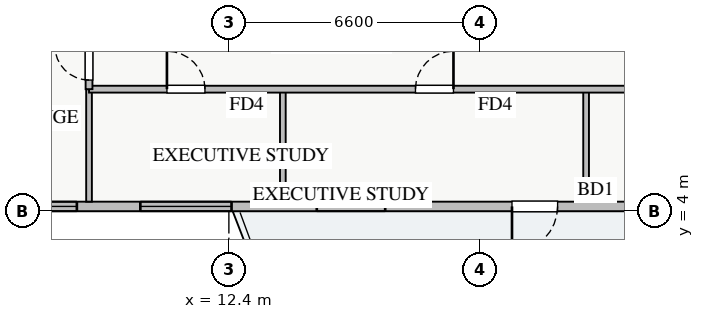
"""IFC4 building model, lengths in metres.
Left out: names, types, materials, properties, quantities, classifications, styles, units other than length and angle.
Written with IfcOpenShell. Run it as: python <this file> out.ifc"""

import sys

from ifc_helpers import new_model, si_unit, direction, frame, frame_2d, origin, place, context, subcontext, project, spatial, rectangle, extrude, source, transform, mapped, element, fill, save


model = new_model("IFC4")
c1 = context("Model", 3, precision=1e-05, world=origin(), true_north=direction((0.0, 1.0)))
c2 = subcontext(c1, "Body", "Model", "MODEL_VIEW")
j1 = project(units=[si_unit("LENGTHUNIT", "METRE"), si_unit("PLANEANGLEUNIT", "RADIAN")], contexts=[c1])
p1 = place(None, origin())
s1 = spatial("IfcSite", under=j1, at=p1, CompositionType="ELEMENT")
p2 = place(p1, origin())
s2 = spatial("IfcBuilding", under=s1, at=p2, CompositionType="ELEMENT")
p3 = place(p2, frame((0.0, 0.0, 42.5)))
s3 = spatial("IfcBuildingStorey", under=s2, at=p3, CompositionType="ELEMENT", Elevation=42.5)
p4 = place(p3, frame((5.45, 4.125, 0.0), z_axis=(0.0, 0.0, 1.0), x_axis=(1.0, 0.0, 0.0)))
e1 = element("IfcWall", 1, at=p4, inside=s3, PredefinedType="STANDARD", context=c2, shape_type="SweptSolid", body=[
    extrude(rectangle(XDim=27.1, YDim=0.25, at=frame_2d((13.55, 0.0))), origin(), (0.0, 0.0, 1.0), 2.57),
])
p5 = place(p4, frame((14.4, 0.0, 0.0)))
e2 = element("IfcOpeningElement", 2, at=p5, cuts=e1, PredefinedType="OPENING", context=c2, shape_type="SweptSolid", body=[
    extrude(rectangle(XDim=1.2, YDim=2.1, at=frame_2d((0.6, 1.05))), frame((0.0, 0.135, 0.0), z_axis=(0.0, -1.0, 0.0), x_axis=(1.0, 0.0, 0.0)), (0.0, 0.0, 1.0), 0.27),
])
p6 = place(p4, frame((1.45, 0.0, 0.9)))
e3 = element("IfcOpeningElement", 3, at=p6, cuts=e1, PredefinedType="OPENING", context=c2, shape_type="SweptSolid", body=[
    extrude(rectangle(XDim=1.5, YDim=1.5, at=frame_2d((0.75, 0.75))), frame((0.0, 0.135, 0.0), z_axis=(0.0, -1.0, 0.0), x_axis=(1.0, 0.0, 0.0)), (0.0, 0.0, 1.0), 0.27),
])
p7 = place(p4, frame((9.263, 0.0, 0.9)))
e4 = element("IfcOpeningElement", 4, at=p7, cuts=e1, PredefinedType="OPENING", context=c2, shape_type="SweptSolid", body=[
    extrude(rectangle(XDim=1.8, YDim=1.45, at=frame_2d((0.9, 0.725))), frame((0.0, 0.135, 0.0), z_axis=(0.0, -1.0, 0.0), x_axis=(1.0, 0.0, 0.0)), (0.0, 0.0, 1.0), 0.27),
])
p8 = place(p4, frame((17.92, 0.0, 0.9)))
e5 = element("IfcOpeningElement", 5, at=p8, cuts=e1, PredefinedType="OPENING", context=c2, shape_type="SweptSolid", body=[
    extrude(rectangle(XDim=1.5, YDim=1.5, at=frame_2d((0.75, 0.75))), frame((0.0, 0.135, 0.0), z_axis=(0.0, -1.0, 0.0), x_axis=(1.0, 0.0, 0.0)), (0.0, 0.0, 1.0), 0.27),
])
p9 = place(p4, frame((22.663, 0.0, 0.9)))
e6 = element("IfcOpeningElement", 6, at=p9, cuts=e1, PredefinedType="OPENING", context=c2, shape_type="SweptSolid", body=[
    extrude(rectangle(XDim=2.1, YDim=1.48, at=frame_2d((1.05, 0.74))), frame((0.0, 0.135, 0.0), z_axis=(0.0, -1.0, 0.0), x_axis=(1.0, 0.0, 0.0)), (0.0, 0.0, 1.0), 0.27),
])
p10 = place(p4, frame((4.62, 0.0, 0.9)))
e7 = element("IfcOpeningElement", 7, at=p10, cuts=e1, PredefinedType="OPENING", context=c2, shape_type="SweptSolid", body=[
    extrude(rectangle(XDim=2.4, YDim=1.5, at=frame_2d((1.2, 0.75))), frame((0.0, 0.135, 0.0), z_axis=(0.0, -1.0, 0.0), x_axis=(1.0, 0.0, 0.0)), (0.0, 0.0, 1.0), 0.27),
])
for number, where, z_axis, x_axis in (
    (8, (13.82, 4.25, 0.0), (0.0, 0.0, 1.0), (0.0, 1.0, 0.0)),
    (9, (21.8, 4.25, 0.0), (0.0, 0.0, 1.0), (0.0, 1.0, 0.0)),
    (10, (8.72, 4.25, 0.0), (0.0, 0.0, 1.0), (0.0, 1.0, 0.0)),
):
    element("IfcWall", number, at=place(p3, frame(where, z_axis=z_axis, x_axis=x_axis)), inside=s3, PredefinedType="PARTITIONING", context=c2, shape_type="SweptSolid", body=[
        extrude(rectangle(XDim=2.96, YDim=0.15, at=frame_2d((1.48, 0.0))), origin(), (0.0, 0.0, 1.0), 3.03),
    ])
p11 = place(p3, frame((8.72, 7.21, 0.0), z_axis=(0.0, 0.0, 1.0), x_axis=(1.0, 0.0, 0.0)))
e11 = element("IfcWall", 11, at=p11, inside=s3, PredefinedType="PARTITIONING", context=c2, shape_type="SweptSolid", body=[
    extrude(rectangle(XDim=23.63, YDim=0.18, at=frame_2d((11.815, 0.0))), origin(), (0.0, 0.0, 1.0), 3.03),
])
p12 = place(p11, frame((2.05, 0.0, 0.0)))
e12 = element("IfcOpeningElement", 12, at=p12, cuts=e11, PredefinedType="OPENING", context=c2, shape_type="SweptSolid", body=[
    extrude(rectangle(XDim=1.0, YDim=2.05, at=frame_2d((0.5, 1.025))), frame((0.0, 0.1, 0.0), z_axis=(0.0, -1.0, 0.0), x_axis=(1.0, 0.0, 0.0)), (0.0, 0.0, 1.0), 0.2),
])
p13 = place(p11, frame((8.59, 0.0, 0.0)))
e13 = element("IfcOpeningElement", 13, at=p13, cuts=e11, PredefinedType="OPENING", context=c2, shape_type="SweptSolid", body=[
    extrude(rectangle(XDim=1.0, YDim=2.05, at=frame_2d((0.5, 1.025))), frame((0.0, 0.1, 0.0), z_axis=(0.0, -1.0, 0.0), x_axis=(1.0, 0.0, 0.0)), (0.0, 0.0, 1.0), 0.2),
])
p14 = place(p11, frame((14.9, 0.0, 0.0)))
e14 = element("IfcOpeningElement", 14, at=p14, cuts=e11, PredefinedType="OPENING", context=c2, shape_type="SweptSolid", body=[
    extrude(rectangle(XDim=1.0, YDim=2.05, at=frame_2d((0.5, 1.025))), frame((0.0, 0.1, 0.0), z_axis=(0.0, -1.0, 0.0), x_axis=(1.0, 0.0, 0.0)), (0.0, 0.0, 1.0), 0.2),
])
p15 = place(p11, frame((20.175, 0.0, 0.0)))
e15 = element("IfcOpeningElement", 15, at=p15, cuts=e11, PredefinedType="OPENING", context=c2, shape_type="SweptSolid", body=[
    extrude(rectangle(XDim=1.0, YDim=2.05, at=frame_2d((0.5, 1.025))), frame((0.0, 0.1, 0.0), z_axis=(0.0, -1.0, 0.0), x_axis=(1.0, 0.0, 0.0)), (0.0, 0.0, 1.0), 0.2),
])
p16 = place(p3, frame((8.72, 7.21, 0.0), z_axis=(0.0, 0.0, 1.0), x_axis=(0.0, 1.0, 0.0)))
e16 = element("IfcWall", 16, at=p16, inside=s3, PredefinedType="PARTITIONING", context=c2, shape_type="SweptSolid", body=[
    extrude(rectangle(XDim=31.23, YDim=0.18, at=frame_2d((15.615, 0.0))), origin(), (0.0, 0.0, 1.0), 3.03),
])
p17 = place(p16, frame((30.09, 0.0, 0.0)))
e17 = element("IfcOpeningElement", 17, at=p17, cuts=e16, PredefinedType="OPENING", context=c2, shape_type="SweptSolid", body=[
    extrude(rectangle(XDim=0.9, YDim=2.05, at=frame_2d((0.45, 1.025))), frame((0.0, 0.1, 0.0), z_axis=(0.0, -1.0, 0.0), x_axis=(1.0, 0.0, 0.0)), (0.0, 0.0, 1.0), 0.2),
])
p18 = place(p16, frame((0.24, 0.0, 0.0)))
e18 = element("IfcOpeningElement", 18, at=p18, cuts=e16, PredefinedType="OPENING", context=c2, shape_type="SweptSolid", body=[
    extrude(rectangle(XDim=0.9, YDim=2.05, at=frame_2d((0.45, 1.025))), frame((0.0, 0.1, 0.0), z_axis=(0.0, -1.0, 0.0), x_axis=(1.0, 0.0, 0.0)), (0.0, 0.0, 1.0), 0.2),
])
p19 = place(p16, frame((5.265, 0.0, 0.0)))
e19 = element("IfcOpeningElement", 19, at=p19, cuts=e16, PredefinedType="OPENING", context=c2, shape_type="SweptSolid", body=[
    extrude(rectangle(XDim=1.0, YDim=2.05, at=frame_2d((0.5, 1.025))), frame((0.0, 0.1, 0.0), z_axis=(0.0, -1.0, 0.0), x_axis=(1.0, 0.0, 0.0)), (0.0, 0.0, 1.0), 0.2),
])
p20 = place(p16, frame((11.93, 0.0, 0.0)))
e20 = element("IfcOpeningElement", 20, at=p20, cuts=e16, PredefinedType="OPENING", context=c2, shape_type="SweptSolid", body=[
    extrude(rectangle(XDim=1.0, YDim=2.05, at=frame_2d((0.5, 1.025))), frame((0.0, 0.1, 0.0), z_axis=(0.0, -1.0, 0.0), x_axis=(1.0, 0.0, 0.0)), (0.0, 0.0, 1.0), 0.2),
])
p21 = place(p16, frame((21.96, 0.0, 0.0)))
e21 = element("IfcOpeningElement", 21, at=p21, cuts=e16, PredefinedType="OPENING", context=c2, shape_type="SweptSolid", body=[
    extrude(rectangle(XDim=1.0, YDim=2.05, at=frame_2d((0.5, 1.025))), frame((0.0, 0.1, 0.0), z_axis=(0.0, -1.0, 0.0), x_axis=(1.0, 0.0, 0.0)), (0.0, 0.0, 1.0), 0.2),
])
m1 = source(origin(), c2, "Body", "SweptSolid", [
    extrude(rectangle(XDim=1.2, YDim=2.1, at=frame_2d((0.6, 1.05))), frame((0.0, 0.025, 0.0), z_axis=(0.0, -1.0, 0.0), x_axis=(1.0, 0.0, 0.0)), (0.0, 0.0, 1.0), 0.05),
])
p22 = place(p5, frame((1.2, 0.0, 0.0), z_axis=(0.0, 0.0, 1.0), x_axis=(-1.0, 0.0, 0.0)))
e22 = element("IfcDoor", 22, at=p22, inside=s3, OperationType="SINGLE_SWING_LEFT", PredefinedType="DOOR", context=c2, shape_type="MappedRepresentation", body=[
    mapped(m1, transform((0.0, 0.0, 0.0), x_axis=(1.0, 0.0, 0.0), y_axis=(0.0, 1.0, 0.0), z_axis=(0.0, 0.0, 1.0), scale=1.0)),
])
fill(e2, e22)
m2 = source(origin(), c2, "Body", "SweptSolid", [
    extrude(rectangle(XDim=1.5, YDim=1.5, at=frame_2d((0.75, 0.75))), frame((0.0, 0.03, 0.0), z_axis=(0.0, -1.0, 0.0), x_axis=(1.0, 0.0, 0.0)), (0.0, 0.0, 1.0), 0.06),
])
p23 = place(p6, origin())
e23 = element("IfcWindow", 23, at=p23, inside=s3, PartitioningType="TRIPLE_PANEL_VERTICAL", PredefinedType="WINDOW", context=c2, shape_type="MappedRepresentation", body=[
    mapped(m2, transform((0.0, 0.0, 0.0), x_axis=(1.0, 0.0, 0.0), y_axis=(0.0, 1.0, 0.0), z_axis=(0.0, 0.0, 1.0), scale=1.0)),
])
fill(e3, e23)
m3 = source(origin(), c2, "Body", "SweptSolid", [
    extrude(rectangle(XDim=1.8, YDim=1.45, at=frame_2d((0.9, 0.725))), frame((0.0, 0.03, 0.0), z_axis=(0.0, -1.0, 0.0), x_axis=(1.0, 0.0, 0.0)), (0.0, 0.0, 1.0), 0.06),
])
p24 = place(p7, origin())
e24 = element("IfcWindow", 24, at=p24, inside=s3, PartitioningType="DOUBLE_PANEL_VERTICAL", PredefinedType="WINDOW", context=c2, shape_type="MappedRepresentation", body=[
    mapped(m3, transform((0.0, 0.0, 0.0), x_axis=(1.0, 0.0, 0.0), y_axis=(0.0, 1.0, 0.0), z_axis=(0.0, 0.0, 1.0), scale=1.0)),
])
fill(e4, e24)
m4 = source(origin(), c2, "Body", "SweptSolid", [
    extrude(rectangle(XDim=1.0, YDim=2.05, at=frame_2d((0.5, 1.025))), frame((0.0, 0.025, 0.0), z_axis=(0.0, -1.0, 0.0), x_axis=(1.0, 0.0, 0.0)), (0.0, 0.0, 1.0), 0.05),
])
p25 = place(p12, origin())
e25 = element("IfcDoor", 25, at=p25, inside=s3, OperationType="SINGLE_SWING_LEFT", PredefinedType="DOOR", context=c2, shape_type="MappedRepresentation", body=[
    mapped(m4, transform((0.0, 0.0, 0.0), x_axis=(1.0, 0.0, 0.0), y_axis=(0.0, 1.0, 0.0), z_axis=(0.0, 0.0, 1.0), scale=1.0)),
])
fill(e12, e25)
p26 = place(p13, origin())
e26 = element("IfcDoor", 26, at=p26, inside=s3, OperationType="SINGLE_SWING_RIGHT", PredefinedType="DOOR", context=c2, shape_type="MappedRepresentation", body=[
    mapped(m4, transform((0.0, 0.0, 0.0), x_axis=(1.0, 0.0, 0.0), y_axis=(0.0, 1.0, 0.0), z_axis=(0.0, 0.0, 1.0), scale=1.0)),
])
fill(e13, e26)
m5 = source(origin(), c2, "Body", "SweptSolid", [
    extrude(rectangle(XDim=0.9, YDim=2.05, at=frame_2d((0.45, 1.025))), frame((0.0, 0.025, 0.0), z_axis=(0.0, -1.0, 0.0), x_axis=(1.0, 0.0, 0.0)), (0.0, 0.0, 1.0), 0.05),
])
p27 = place(p18, origin())
e27 = element("IfcDoor", 27, at=p27, inside=s3, OperationType="SINGLE_SWING_RIGHT", PredefinedType="DOOR", context=c2, shape_type="MappedRepresentation", body=[
    mapped(m5, transform((0.0, 0.0, 0.0), x_axis=(1.0, 0.0, 0.0), y_axis=(0.0, 1.0, 0.0), z_axis=(0.0, 0.0, 1.0), scale=1.0)),
])
fill(e18, e27)
m6 = source(origin(), c2, "Body", "SweptSolid", [
    extrude(rectangle(XDim=2.4, YDim=1.5, at=frame_2d((1.2, 0.75))), frame((0.0, 0.03, 0.0), z_axis=(0.0, -1.0, 0.0), x_axis=(1.0, 0.0, 0.0)), (0.0, 0.0, 1.0), 0.06),
])
p28 = place(p10, origin())
e28 = element("IfcWindow", 28, at=p28, inside=s3, PartitioningType="TRIPLE_PANEL_VERTICAL", PredefinedType="WINDOW", context=c2, shape_type="MappedRepresentation", body=[
    mapped(m6, transform((0.0, 0.0, 0.0), x_axis=(1.0, 0.0, 0.0), y_axis=(0.0, 1.0, 0.0), z_axis=(0.0, 0.0, 1.0), scale=1.0)),
])
fill(e7, e28)
save(model, sys.argv[1])
